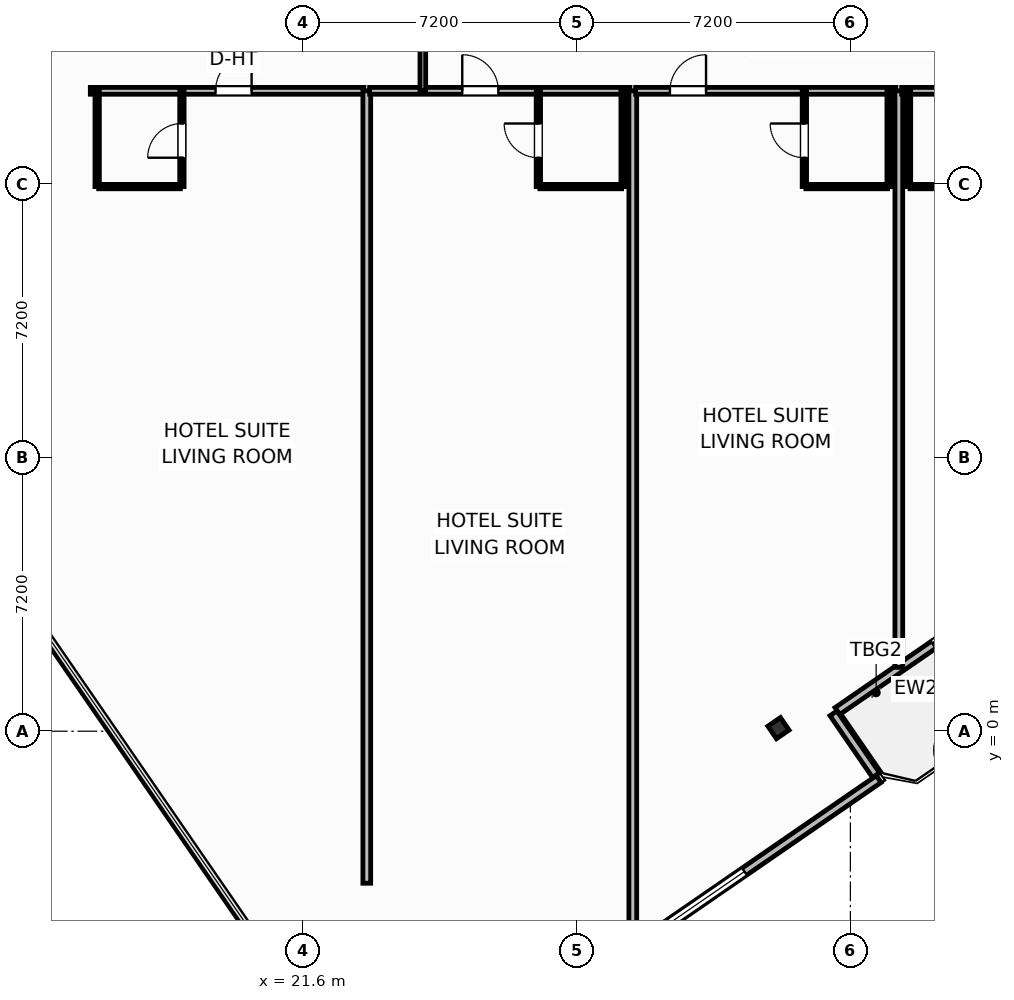
"""IFC4 building model, lengths in metres.
Left out: names, types, materials, properties, quantities, classifications, styles, units other than length and angle.
Written with IfcOpenShell. Run it as: python <this file> out.ifc"""

import sys

from ifc_helpers import new_model, si_unit, direction, frame, frame_2d, origin, origin_2d, place, context, subcontext, project, spatial, rectangle, i_section, extrude, element, fill, save


model = new_model("IFC4")
c1 = context("Model", 3, precision=1e-05, world=origin(), true_north=direction((0.0, 1.0)))
c2 = subcontext(c1, "Body", "Model", "MODEL_VIEW")
j1 = project(units=[si_unit("LENGTHUNIT", "METRE"), si_unit("PLANEANGLEUNIT", "RADIAN")], contexts=[c1])
p1 = place(None, origin())
s1 = spatial("IfcSite", under=j1, at=p1, CompositionType="ELEMENT")
p2 = place(p1, origin())
s2 = spatial("IfcBuilding", under=s1, at=p2, CompositionType="ELEMENT")
p3 = place(p2, frame((0.0, 0.0, 284.1)))
s3 = spatial("IfcBuildingStorey", under=s2, at=p3, CompositionType="ELEMENT", Elevation=284.1)
p4 = place(p3, frame((34.107, 0.081, 0.0), z_axis=(0.0, 0.0, 1.0), x_axis=(0.823532597628, 0.567268949127, 0.0)))
e1 = element("IfcColumn", 1, at=p4, inside=s3, PredefinedType="COLUMN", context=c2, shape_type="SweptSolid", body=[
    extrude(i_section(OverallWidth=0.401, OverallDepth=0.399, WebThickness=0.025, FlangeThickness=0.04, FilletRadius=0.022, at=origin_2d()), origin(), (0.0, 0.0, 1.0), 3.7),
])
p5 = place(p3, frame((40.244, 3.688, 0.0), z_axis=(0.0, 0.0, 1.0), x_axis=(-0.823541290762, -0.567256328665, 0.0)))
e2 = element("IfcWall", 2, at=p5, inside=s3, PredefinedType="SOLIDWALL", context=c2, shape_type="SweptSolid", body=[
    extrude(rectangle(XDim=5.567, YDim=0.22, at=frame_2d((2.784, 0.0))), origin(), (0.0, 0.0, 1.0), 2.73),
])
p6 = place(p5, frame((0.4, 0.0, 0.0)))
e3 = element("IfcOpeningElement", 3, at=p6, cuts=e2, PredefinedType="OPENING", context=c2, shape_type="SweptSolid", body=[
    extrude(rectangle(XDim=2.1, YDim=2.3, at=frame_2d((1.05, 1.15))), frame((0.0, 0.12, 0.0), z_axis=(0.0, -1.0, 0.0), x_axis=(1.0, 0.0, 0.0)), (0.0, 0.0, 1.0), 0.24),
])
p7 = place(p3, frame((27.704, -7.488, 0.0), z_axis=(0.0, 0.0, 1.0), x_axis=(0.823529068157, 0.567274073003, 0.0)))
e4 = element("IfcWall", 4, at=p7, inside=s3, PredefinedType="SOLIDWALL", context=c2, shape_type="SweptSolid", body=[
    extrude(rectangle(XDim=10.98, YDim=0.22, at=frame_2d((5.49, 0.0))), origin(), (0.0, 0.0, 1.0), 2.73),
])
p8 = place(p7, frame((4.29, 0.0, 0.8)))
e5 = element("IfcOpeningElement", 5, at=p8, cuts=e4, PredefinedType="OPENING", context=c2, shape_type="SweptSolid", body=[
    extrude(rectangle(XDim=2.4, YDim=1.85, at=frame_2d((1.2, 0.925))), frame((0.0, 0.12, 0.0), z_axis=(0.0, -1.0, 0.0), x_axis=(1.0, 0.0, 0.0)), (0.0, 0.0, 1.0), 0.24),
])
p9 = place(p3, frame((36.675, -1.156, 0.0), z_axis=(0.0, 0.0, 1.0), x_axis=(-0.567215821234, 0.823569190865, 0.0)))
e6 = element("IfcWall", 6, at=p9, inside=s3, PredefinedType="SOLIDWALL", context=c2, shape_type="SweptSolid", body=[
    extrude(rectangle(XDim=1.975, YDim=0.22, at=frame_2d((0.988, 0.0))), origin(), (0.0, 0.0, 1.0), 2.73),
])
p10 = place(p3, frame((16.0, 16.85, 0.0), z_axis=(0.0, 0.0, 1.0), x_axis=(1.0, 0.0, 0.0)))
e7 = element("IfcWall", 7, at=p10, inside=s3, PredefinedType="PARTITIONING", context=c2, shape_type="SweptSolid", body=[
    extrude(rectangle(XDim=7.2, YDim=0.18, at=frame_2d((3.6, 0.0))), origin(), (0.0, 0.0, 1.0), 3.45),
])
p11 = place(p10, frame((3.294, 0.0, 0.0)))
e8 = element("IfcOpeningElement", 8, at=p11, cuts=e7, PredefinedType="OPENING", context=c2, shape_type="SweptSolid", body=[
    extrude(rectangle(XDim=0.95, YDim=2.15, at=frame_2d((0.475, 1.075))), frame((0.0, 0.1, 0.0), z_axis=(0.0, -1.0, 0.0), x_axis=(1.0, 0.0, 0.0)), (0.0, 0.0, 1.0), 0.2),
])
p12 = place(p3, frame((16.22, 14.33, 0.0), z_axis=(0.0, 0.0, 1.0), x_axis=(1.0, 0.0, 0.0)))
e9 = element("IfcWall", 9, at=p12, inside=s3, PredefinedType="PARTITIONING", context=c2, shape_type="SweptSolid", body=[
    extrude(rectangle(XDim=2.15, YDim=0.115, at=frame_2d((1.075, 0.0))), origin(), (0.0, 0.0, 1.0), 3.45),
])
p13 = place(p3, frame((18.41, 14.33, 0.0), z_axis=(0.0, 0.0, 1.0), x_axis=(0.0, 1.0, 0.0)))
e10 = element("IfcWall", 10, at=p13, inside=s3, PredefinedType="PARTITIONING", context=c2, shape_type="SweptSolid", body=[
    extrude(rectangle(XDim=2.52, YDim=0.115, at=frame_2d((1.26, 0.0))), origin(), (0.0, 0.0, 1.0), 3.45),
])
p14 = place(p13, frame((0.76, 0.0, 0.0)))
e11 = element("IfcOpeningElement", 11, at=p14, cuts=e10, PredefinedType="OPENING", context=c2, shape_type="SweptSolid", body=[
    extrude(rectangle(XDim=0.9, YDim=2.05, at=frame_2d((0.45, 1.025))), frame((0.0, 0.067, 0.0), z_axis=(0.0, -1.0, 0.0), x_axis=(1.0, 0.0, 0.0)), (0.0, 0.0, 1.0), 0.135),
])
p15 = place(p3, frame((16.18, 14.33, 0.0), z_axis=(0.0, 0.0, 1.0), x_axis=(0.0, 1.0, 0.0)))
e12 = element("IfcWall", 12, at=p15, inside=s3, PredefinedType="PARTITIONING", context=c2, shape_type="SweptSolid", body=[
    extrude(rectangle(XDim=2.52, YDim=0.115, at=frame_2d((1.26, 0.0))), origin(), (0.0, 0.0, 1.0), 3.45),
])
p16 = place(p3, frame((23.275, -4.0, 0.0), z_axis=(0.0, 0.0, 1.0), x_axis=(0.0, 1.0, 0.0)))
e13 = element("IfcWall", 13, at=p16, inside=s3, PredefinedType="PARTITIONING", context=c2, shape_type="SweptSolid", body=[
    extrude(rectangle(XDim=20.85, YDim=0.205, at=frame_2d((10.425, 0.0))), origin(), (0.0, 0.0, 1.0), 3.45),
])
p17 = place(p3, frame((23.35, 16.85, 0.0), z_axis=(0.0, 0.0, 1.0), x_axis=(1.0, 0.0, 0.0)))
e14 = element("IfcWall", 14, at=p17, inside=s3, PredefinedType="PARTITIONING", context=c2, shape_type="SweptSolid", body=[
    extrude(rectangle(XDim=6.85, YDim=0.18, at=frame_2d((3.425, 0.0))), origin(), (0.0, 0.0, 1.0), 3.45),
])
p18 = place(p17, frame((2.437, 0.0, 0.0)))
e15 = element("IfcOpeningElement", 15, at=p18, cuts=e14, PredefinedType="OPENING", context=c2, shape_type="SweptSolid", body=[
    extrude(rectangle(XDim=0.95, YDim=2.15, at=frame_2d((0.475, 1.075))), frame((0.0, 0.1, 0.0), z_axis=(0.0, -1.0, 0.0), x_axis=(1.0, 0.0, 0.0)), (0.0, 0.0, 1.0), 0.2),
])
p19 = place(p3, frame((27.83, 14.33, 0.0), z_axis=(0.0, 0.0, 1.0), x_axis=(1.0, 0.0, 0.0)))
e16 = element("IfcWall", 16, at=p19, inside=s3, PredefinedType="PARTITIONING", context=c2, shape_type="SweptSolid", body=[
    extrude(rectangle(XDim=2.15, YDim=0.115, at=frame_2d((1.075, 0.0))), origin(), (0.0, 0.0, 1.0), 3.45),
])
p20 = place(p3, frame((27.79, 14.33, 0.0), z_axis=(0.0, 0.0, 1.0), x_axis=(0.0, 1.0, 0.0)))
e17 = element("IfcWall", 17, at=p20, inside=s3, PredefinedType="PARTITIONING", context=c2, shape_type="SweptSolid", body=[
    extrude(rectangle(XDim=2.52, YDim=0.115, at=frame_2d((1.26, 0.0))), origin(), (0.0, 0.0, 1.0), 3.45),
])
p21 = place(p20, frame((0.76, 0.0, 0.0)))
e18 = element("IfcOpeningElement", 18, at=p21, cuts=e17, PredefinedType="OPENING", context=c2, shape_type="SweptSolid", body=[
    extrude(rectangle(XDim=0.9, YDim=2.05, at=frame_2d((0.45, 1.025))), frame((0.0, 0.067, 0.0), z_axis=(0.0, -1.0, 0.0), x_axis=(1.0, 0.0, 0.0)), (0.0, 0.0, 1.0), 0.135),
])
p22 = place(p3, frame((30.02, 14.33, 0.0), z_axis=(0.0, 0.0, 1.0), x_axis=(0.0, 1.0, 0.0)))
e19 = element("IfcWall", 19, at=p22, inside=s3, PredefinedType="PARTITIONING", context=c2, shape_type="SweptSolid", body=[
    extrude(rectangle(XDim=2.52, YDim=0.115, at=frame_2d((1.26, 0.0))), origin(), (0.0, 0.0, 1.0), 3.45),
])
p23 = place(p3, frame((30.275, -5.611, 0.0), z_axis=(0.0, 0.0, 1.0), x_axis=(0.0, 1.0, 0.0)))
e20 = element("IfcWall", 20, at=p23, inside=s3, PredefinedType="PARTITIONING", context=c2, shape_type="SweptSolid", body=[
    extrude(rectangle(XDim=22.461, YDim=0.205, at=frame_2d((11.23, 0.0))), origin(), (0.0, 0.0, 1.0), 3.45),
])
p24 = place(p3, frame((30.35, 16.85, 0.0), z_axis=(0.0, 0.0, 1.0), x_axis=(1.0, 0.0, 0.0)))
e21 = element("IfcWall", 21, at=p24, inside=s3, PredefinedType="PARTITIONING", context=c2, shape_type="SweptSolid", body=[
    extrude(rectangle(XDim=6.85, YDim=0.18, at=frame_2d((3.425, 0.0))), origin(), (0.0, 0.0, 1.0), 3.45),
])
p25 = place(p24, frame((0.902, 0.0, 0.0)))
e22 = element("IfcOpeningElement", 22, at=p25, cuts=e21, PredefinedType="OPENING", context=c2, shape_type="SweptSolid", body=[
    extrude(rectangle(XDim=0.95, YDim=2.15, at=frame_2d((0.475, 1.075))), frame((0.0, 0.1, 0.0), z_axis=(0.0, -1.0, 0.0), x_axis=(1.0, 0.0, 0.0)), (0.0, 0.0, 1.0), 0.2),
])
p26 = place(p3, frame((34.83, 14.33, 0.0), z_axis=(0.0, 0.0, 1.0), x_axis=(1.0, 0.0, 0.0)))
e23 = element("IfcWall", 23, at=p26, inside=s3, PredefinedType="PARTITIONING", context=c2, shape_type="SweptSolid", body=[
    extrude(rectangle(XDim=2.15, YDim=0.115, at=frame_2d((1.075, 0.0))), origin(), (0.0, 0.0, 1.0), 3.45),
])
p27 = place(p3, frame((34.79, 14.33, 0.0), z_axis=(0.0, 0.0, 1.0), x_axis=(0.0, 1.0, 0.0)))
e24 = element("IfcWall", 24, at=p27, inside=s3, PredefinedType="PARTITIONING", context=c2, shape_type="SweptSolid", body=[
    extrude(rectangle(XDim=2.52, YDim=0.115, at=frame_2d((1.26, 0.0))), origin(), (0.0, 0.0, 1.0), 3.45),
])
p28 = place(p27, frame((0.76, 0.0, 0.0)))
e25 = element("IfcOpeningElement", 25, at=p28, cuts=e24, PredefinedType="OPENING", context=c2, shape_type="SweptSolid", body=[
    extrude(rectangle(XDim=0.9, YDim=2.05, at=frame_2d((0.45, 1.025))), frame((0.0, 0.067, 0.0), z_axis=(0.0, -1.0, 0.0), x_axis=(1.0, 0.0, 0.0)), (0.0, 0.0, 1.0), 0.135),
])
p29 = place(p3, frame((37.02, 14.33, 0.0), z_axis=(0.0, 0.0, 1.0), x_axis=(0.0, 1.0, 0.0)))
e26 = element("IfcWall", 26, at=p29, inside=s3, PredefinedType="PARTITIONING", context=c2, shape_type="SweptSolid", body=[
    extrude(rectangle(XDim=2.52, YDim=0.115, at=frame_2d((1.26, 0.0))), origin(), (0.0, 0.0, 1.0), 3.45),
])
p30 = place(p3, frame((37.275, 1.68, 0.0), z_axis=(0.0, 0.0, 1.0), x_axis=(0.0, 1.0, 0.0)))
e27 = element("IfcWall", 27, at=p30, inside=s3, PredefinedType="PARTITIONING", context=c2, shape_type="SweptSolid", body=[
    extrude(rectangle(XDim=15.17, YDim=0.205, at=frame_2d((7.585, 0.0))), origin(), (0.0, 0.0, 1.0), 3.45),
])
p31 = place(p3, frame((37.35, 16.85, 0.0), z_axis=(0.0, 0.0, 1.0), x_axis=(1.0, 0.0, 0.0)))
e28 = element("IfcWall", 28, at=p31, inside=s3, PredefinedType="PARTITIONING", context=c2, shape_type="SweptSolid", body=[
    extrude(rectangle(XDim=6.85, YDim=0.18, at=frame_2d((3.425, 0.0))), origin(), (0.0, 0.0, 1.0), 3.45),
])
p32 = place(p31, frame((3.292, 0.0, 0.0)))
e29 = element("IfcOpeningElement", 29, at=p32, cuts=e28, PredefinedType="OPENING", context=c2, shape_type="SweptSolid", body=[
    extrude(rectangle(XDim=0.95, YDim=2.15, at=frame_2d((0.475, 1.075))), frame((0.0, 0.1, 0.0), z_axis=(0.0, -1.0, 0.0), x_axis=(1.0, 0.0, 0.0)), (0.0, 0.0, 1.0), 0.2),
])
p33 = place(p3, frame((37.57, 14.33, 0.0), z_axis=(0.0, 0.0, 1.0), x_axis=(1.0, 0.0, 0.0)))
e30 = element("IfcWall", 30, at=p33, inside=s3, PredefinedType="PARTITIONING", context=c2, shape_type="SweptSolid", body=[
    extrude(rectangle(XDim=2.15, YDim=0.115, at=frame_2d((1.075, 0.0))), origin(), (0.0, 0.0, 1.0), 3.45),
])
p34 = place(p3, frame((37.53, 14.33, 0.0), z_axis=(0.0, 0.0, 1.0), x_axis=(0.0, 1.0, 0.0)))
e31 = element("IfcWall", 31, at=p34, inside=s3, PredefinedType="PARTITIONING", context=c2, shape_type="SweptSolid", body=[
    extrude(rectangle(XDim=2.52, YDim=0.115, at=frame_2d((1.26, 0.0))), origin(), (0.0, 0.0, 1.0), 3.45),
])
p35 = place(p3, frame((24.75, 16.85, 0.0), z_axis=(0.0, 0.0, 1.0), x_axis=(0.0, 1.0, 0.0)))
e32 = element("IfcWall", 32, at=p35, inside=s3, PredefinedType="PARTITIONING", context=c2, shape_type="SweptSolid", body=[
    extrude(rectangle(XDim=23.325, YDim=0.15, at=frame_2d((11.663, 0.0))), origin(), (0.0, 0.0, 1.0), 3.45),
])
p36 = place(p35, frame((6.0, 0.0, 0.0)))
e33 = element("IfcOpeningElement", 33, at=p36, cuts=e32, PredefinedType="OPENING", context=c2, shape_type="SweptSolid", body=[
    extrude(rectangle(XDim=1.0, YDim=2.05, at=frame_2d((0.5, 1.025))), frame((0.0, 0.085, 0.0), z_axis=(0.0, -1.0, 0.0), x_axis=(1.0, 0.0, 0.0)), (0.0, 0.0, 1.0), 0.17),
])
p37 = place(p6, origin())
e34 = element("IfcDoor", 34, at=p37, inside=s3, OperationType="SLIDING_TO_LEFT", PredefinedType="DOOR", context=c2, shape_type="SweptSolid", body=[
    extrude(rectangle(XDim=2.1, YDim=2.3, at=frame_2d((1.05, 1.15))), frame((0.0, 0.025, 0.0), z_axis=(0.0, -1.0, 0.0), x_axis=(1.0, 0.0, 0.0)), (0.0, 0.0, 1.0), 0.05),
])
fill(e3, e34)
p38 = place(p8, origin())
e35 = element("IfcWindow", 35, at=p38, inside=s3, PartitioningType="SINGLE_PANEL", PredefinedType="WINDOW", context=c2, shape_type="SweptSolid", body=[
    extrude(rectangle(XDim=2.4, YDim=1.85, at=frame_2d((1.2, 0.925))), frame((0.0, 0.03, 0.0), z_axis=(0.0, -1.0, 0.0), x_axis=(1.0, 0.0, 0.0)), (0.0, 0.0, 1.0), 0.06),
])
fill(e5, e35)
p39 = place(p11, origin())
e36 = element("IfcDoor", 36, at=p39, inside=s3, OperationType="SINGLE_SWING_RIGHT", PredefinedType="DOOR", context=c2, shape_type="SweptSolid", body=[
    extrude(rectangle(XDim=0.95, YDim=2.15, at=frame_2d((0.475, 1.075))), frame((0.0, 0.025, 0.0), z_axis=(0.0, -1.0, 0.0), x_axis=(1.0, 0.0, 0.0)), (0.0, 0.0, 1.0), 0.05),
])
fill(e8, e36)
p40 = place(p14, origin())
e37 = element("IfcDoor", 37, at=p40, inside=s3, OperationType="SINGLE_SWING_LEFT", PredefinedType="DOOR", context=c2, shape_type="SweptSolid", body=[
    extrude(rectangle(XDim=0.9, YDim=2.05, at=frame_2d((0.45, 1.025))), frame((0.0, 0.025, 0.0), z_axis=(0.0, -1.0, 0.0), x_axis=(1.0, 0.0, 0.0)), (0.0, 0.0, 1.0), 0.05),
])
fill(e11, e37)
p41 = place(p18, origin())
e38 = element("IfcDoor", 38, at=p41, inside=s3, OperationType="SINGLE_SWING_LEFT", PredefinedType="DOOR", context=c2, shape_type="SweptSolid", body=[
    extrude(rectangle(XDim=0.95, YDim=2.15, at=frame_2d((0.475, 1.075))), frame((0.0, 0.025, 0.0), z_axis=(0.0, -1.0, 0.0), x_axis=(1.0, 0.0, 0.0)), (0.0, 0.0, 1.0), 0.05),
])
fill(e15, e38)
p42 = place(p21, origin())
e39 = element("IfcDoor", 39, at=p42, inside=s3, OperationType="SINGLE_SWING_RIGHT", PredefinedType="DOOR", context=c2, shape_type="SweptSolid", body=[
    extrude(rectangle(XDim=0.9, YDim=2.05, at=frame_2d((0.45, 1.025))), frame((0.0, 0.025, 0.0), z_axis=(0.0, -1.0, 0.0), x_axis=(1.0, 0.0, 0.0)), (0.0, 0.0, 1.0), 0.05),
])
fill(e18, e39)
p43 = place(p25, origin())
e40 = element("IfcDoor", 40, at=p43, inside=s3, OperationType="SINGLE_SWING_RIGHT", PredefinedType="DOOR", context=c2, shape_type="SweptSolid", body=[
    extrude(rectangle(XDim=0.95, YDim=2.15, at=frame_2d((0.475, 1.075))), frame((0.0, 0.025, 0.0), z_axis=(0.0, -1.0, 0.0), x_axis=(1.0, 0.0, 0.0)), (0.0, 0.0, 1.0), 0.05),
])
fill(e22, e40)
p44 = place(p28, origin())
e41 = element("IfcDoor", 41, at=p44, inside=s3, OperationType="SINGLE_SWING_RIGHT", PredefinedType="DOOR", context=c2, shape_type="SweptSolid", body=[
    extrude(rectangle(XDim=0.9, YDim=2.05, at=frame_2d((0.45, 1.025))), frame((0.0, 0.025, 0.0), z_axis=(0.0, -1.0, 0.0), x_axis=(1.0, 0.0, 0.0)), (0.0, 0.0, 1.0), 0.05),
])
fill(e25, e41)
save(model, sys.argv[1])
